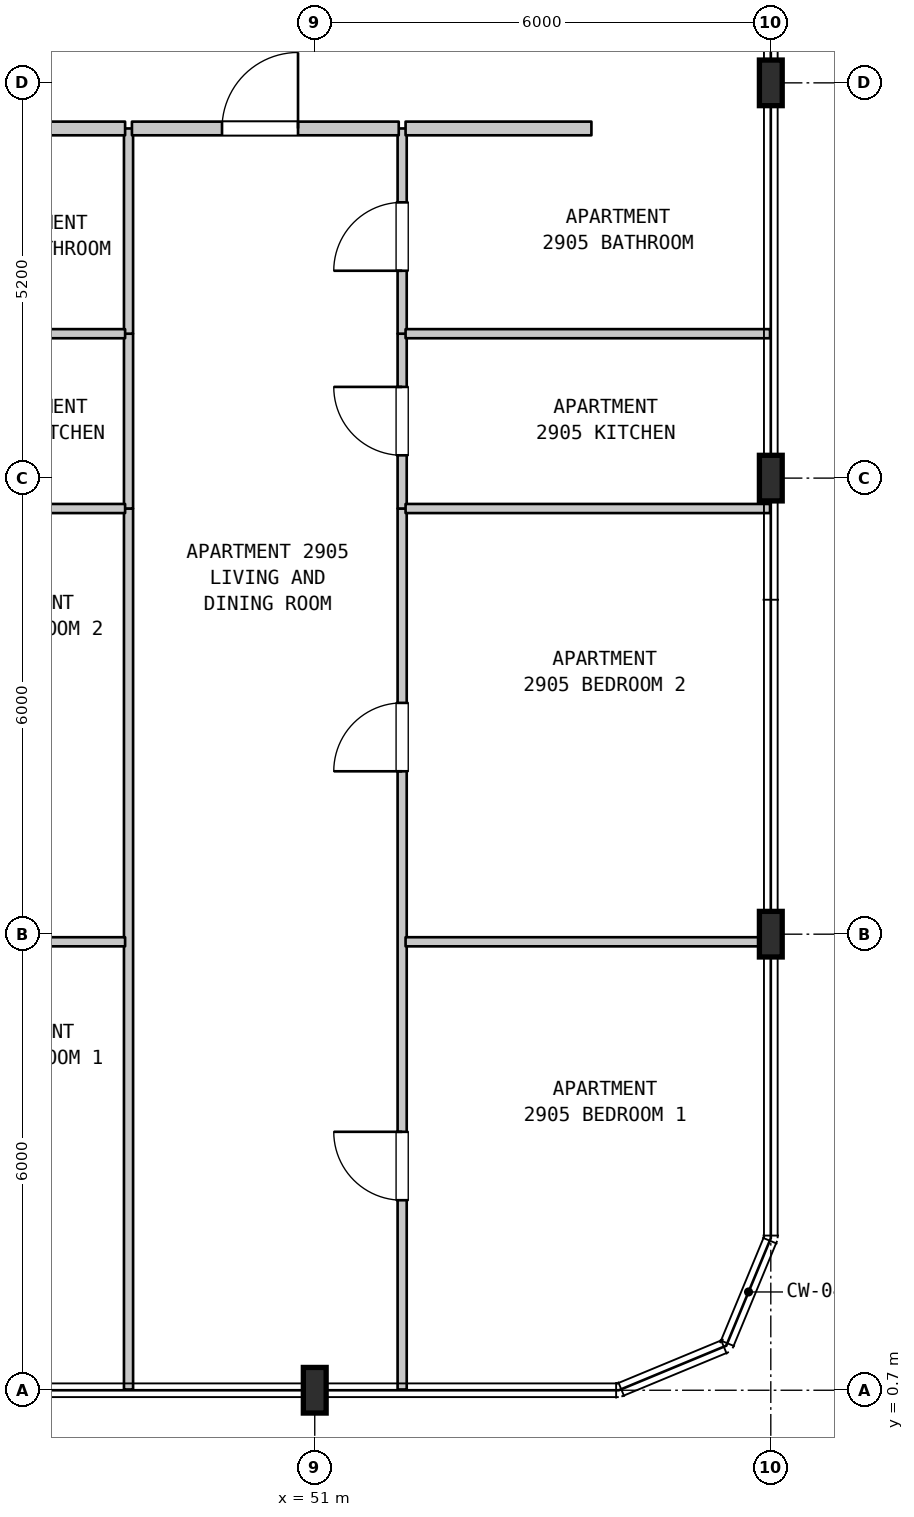
"""IFC4 building model, lengths in metres.
Left out: names, types, materials, properties, quantities, classifications, styles, units other than length and angle.
Written with IfcOpenShell. Run it as: python <this file> out.ifc"""

import sys

from ifc_helpers import new_model, si_unit, direction, frame, frame_2d, origin, origin_2d, place, context, subcontext, project, spatial, rectangle, i_section, extrude, element, fill, save


model = new_model("IFC4")
c1 = context("Model", 3, precision=1e-05, world=origin(), true_north=direction((0.0, 1.0)))
c2 = subcontext(c1, "Body", "Model", "MODEL_VIEW")
j1 = project(units=[si_unit("LENGTHUNIT", "METRE"), si_unit("PLANEANGLEUNIT", "RADIAN")], contexts=[c1])
p1 = place(None, origin())
s1 = spatial("IfcSite", under=j1, at=p1, CompositionType="ELEMENT")
p2 = place(p1, origin())
s2 = spatial("IfcBuilding", under=s1, at=p2, CompositionType="ELEMENT")
p3 = place(p2, frame((0.0, 0.0, 120.5)))
s3 = spatial("IfcBuildingStorey", under=s2, at=p3, CompositionType="ELEMENT", Elevation=120.5)
for number, where, z_axis, x_axis in (
    (1, (51.0, 0.7, 0.0), (0.0, 0.0, 1.0), (1.0, 0.0, 0.0)),
    (2, (57.0, 6.7, 0.0), (0.0, 0.0, 1.0), (1.0, 0.0, 0.0)),
    (3, (57.0, 12.7, 0.0), (0.0, 0.0, 1.0), (1.0, 0.0, 0.0)),
    (4, (57.0, 17.9, 0.0), (0.0, 0.0, 1.0), (1.0, 0.0, 0.0)),
):
    element("IfcColumn", number, at=place(p3, frame(where, z_axis=z_axis, x_axis=x_axis)), inside=s3, PredefinedType="COLUMN", context=c2, shape_type="SweptSolid", body=[
        extrude(i_section(OverallWidth=0.3, OverallDepth=0.6, WebThickness=0.015, FlangeThickness=0.03, FilletRadius=0.027, at=origin_2d()), origin(), (0.0, 0.0, 1.0), 4.8),
    ])
p4 = place(p3, frame((48.55, 0.71, 0.0), z_axis=(0.0, 0.0, 1.0), x_axis=(0.0, 1.0, 0.0)))
e5 = element("IfcWall", 5, at=p4, inside=s3, PredefinedType="PARTITIONING", context=c2, shape_type="SweptSolid", body=[
    extrude(rectangle(XDim=11.59, YDim=0.12, at=frame_2d((5.795, 0.0))), origin(), (0.0, 0.0, 1.0), 4.48),
])
p5 = place(p3, frame((48.55, 12.3, 0.0), z_axis=(0.0, 0.0, 1.0), x_axis=(0.0, 1.0, 0.0)))
e6 = element("IfcWall", 6, at=p5, inside=s3, PredefinedType="PARTITIONING", context=c2, shape_type="SweptSolid", body=[
    extrude(rectangle(XDim=2.3, YDim=0.12, at=frame_2d((1.15, 0.0))), origin(), (0.0, 0.0, 1.0), 4.48),
])
p6 = place(p3, frame((48.55, 14.6, 0.0), z_axis=(0.0, 0.0, 1.0), x_axis=(0.0, 1.0, 0.0)))
e7 = element("IfcWall", 7, at=p6, inside=s3, PredefinedType="PARTITIONING", context=c2, shape_type="SweptSolid", body=[
    extrude(rectangle(XDim=2.7, YDim=0.12, at=frame_2d((1.35, 0.0))), origin(), (0.0, 0.0, 1.0), 4.48),
])
p7 = place(p3, frame((52.15, 0.71, 0.0), z_axis=(0.0, 0.0, 1.0), x_axis=(0.0, 1.0, 0.0)))
e8 = element("IfcWall", 8, at=p7, inside=s3, PredefinedType="PARTITIONING", context=c2, shape_type="SweptSolid", body=[
    extrude(rectangle(XDim=11.59, YDim=0.12, at=frame_2d((5.795, 0.0))), origin(), (0.0, 0.0, 1.0), 4.48),
])
p8 = place(p7, frame((2.49, 0.0, 0.0)))
e9 = element("IfcOpeningElement", 9, at=p8, cuts=e8, PredefinedType="OPENING", context=c2, shape_type="SweptSolid", body=[
    extrude(rectangle(XDim=0.9, YDim=2.15, at=frame_2d((0.45, 1.075))), frame((0.0, 0.07, 0.0), z_axis=(0.0, -1.0, 0.0), x_axis=(1.0, 0.0, 0.0)), (0.0, 0.0, 1.0), 0.14),
])
p9 = place(p7, frame((8.133, 0.0, 0.0)))
e10 = element("IfcOpeningElement", 10, at=p9, cuts=e8, PredefinedType="OPENING", context=c2, shape_type="SweptSolid", body=[
    extrude(rectangle(XDim=0.9, YDim=2.15, at=frame_2d((0.45, 1.075))), frame((0.0, 0.07, 0.0), z_axis=(0.0, -1.0, 0.0), x_axis=(1.0, 0.0, 0.0)), (0.0, 0.0, 1.0), 0.14),
])
p10 = place(p3, frame((52.15, 12.3, 0.0), z_axis=(0.0, 0.0, 1.0), x_axis=(0.0, 1.0, 0.0)))
e11 = element("IfcWall", 11, at=p10, inside=s3, PredefinedType="PARTITIONING", context=c2, shape_type="SweptSolid", body=[
    extrude(rectangle(XDim=2.3, YDim=0.12, at=frame_2d((1.15, 0.0))), origin(), (0.0, 0.0, 1.0), 4.48),
])
p11 = place(p10, frame((0.7, 0.0, 0.0)))
e12 = element("IfcOpeningElement", 12, at=p11, cuts=e11, PredefinedType="OPENING", context=c2, shape_type="SweptSolid", body=[
    extrude(rectangle(XDim=0.9, YDim=2.15, at=frame_2d((0.45, 1.075))), frame((0.0, 0.07, 0.0), z_axis=(0.0, -1.0, 0.0), x_axis=(1.0, 0.0, 0.0)), (0.0, 0.0, 1.0), 0.14),
])
p12 = place(p3, frame((52.15, 14.6, 0.0), z_axis=(0.0, 0.0, 1.0), x_axis=(0.0, 1.0, 0.0)))
e13 = element("IfcWall", 13, at=p12, inside=s3, PredefinedType="PARTITIONING", context=c2, shape_type="SweptSolid", body=[
    extrude(rectangle(XDim=2.7, YDim=0.12, at=frame_2d((1.35, 0.0))), origin(), (0.0, 0.0, 1.0), 4.48),
])
p13 = place(p12, frame((0.828, 0.0, 0.0)))
e14 = element("IfcOpeningElement", 14, at=p13, cuts=e13, PredefinedType="OPENING", context=c2, shape_type="SweptSolid", body=[
    extrude(rectangle(XDim=0.9, YDim=2.1, at=frame_2d((0.45, 1.05))), frame((0.0, 0.07, 0.0), z_axis=(0.0, -1.0, 0.0), x_axis=(1.0, 0.0, 0.0)), (0.0, 0.0, 1.0), 0.14),
])
p14 = place(p3, frame((45.555, 6.6, 0.0), z_axis=(0.0, 0.0, 1.0), x_axis=(1.0, 0.0, 0.0)))
e15 = element("IfcWall", 15, at=p14, inside=s3, PredefinedType="PARTITIONING", context=c2, shape_type="SweptSolid", body=[
    extrude(rectangle(XDim=2.95, YDim=0.12, at=frame_2d((1.475, 0.0))), origin(), (0.0, 0.0, 1.0), 3.88),
])
p15 = place(p3, frame((52.195, 6.6, 0.0), z_axis=(0.0, 0.0, 1.0), x_axis=(1.0, 0.0, 0.0)))
e16 = element("IfcWall", 16, at=p15, inside=s3, PredefinedType="PARTITIONING", context=c2, shape_type="SweptSolid", body=[
    extrude(rectangle(XDim=4.795, YDim=0.12, at=frame_2d((2.397, 0.0))), origin(), (0.0, 0.0, 1.0), 3.88),
])
p16 = place(p3, frame((45.555, 12.3, 0.0), z_axis=(0.0, 0.0, 1.0), x_axis=(1.0, 0.0, 0.0)))
e17 = element("IfcWall", 17, at=p16, inside=s3, PredefinedType="PARTITIONING", context=c2, shape_type="SweptSolid", body=[
    extrude(rectangle(XDim=2.95, YDim=0.12, at=frame_2d((1.475, 0.0))), origin(), (0.0, 0.0, 1.0), 4.48),
])
p17 = place(p3, frame((52.195, 12.3, 0.0), z_axis=(0.0, 0.0, 1.0), x_axis=(1.0, 0.0, 0.0)))
e18 = element("IfcWall", 18, at=p17, inside=s3, PredefinedType="PARTITIONING", context=c2, shape_type="SweptSolid", body=[
    extrude(rectangle(XDim=4.795, YDim=0.12, at=frame_2d((2.397, 0.0))), origin(), (0.0, 0.0, 1.0), 4.48),
])
p18 = place(p3, frame((45.555, 14.6, 0.0), z_axis=(0.0, 0.0, 1.0), x_axis=(1.0, 0.0, 0.0)))
e19 = element("IfcWall", 19, at=p18, inside=s3, PredefinedType="PARTITIONING", context=c2, shape_type="SweptSolid", body=[
    extrude(rectangle(XDim=2.95, YDim=0.12, at=frame_2d((1.475, 0.0))), origin(), (0.0, 0.0, 1.0), 4.48),
])
p19 = place(p3, frame((52.195, 14.6, 0.0), z_axis=(0.0, 0.0, 1.0), x_axis=(1.0, 0.0, 0.0)))
e20 = element("IfcWall", 20, at=p19, inside=s3, PredefinedType="PARTITIONING", context=c2, shape_type="SweptSolid", body=[
    extrude(rectangle(XDim=4.795, YDim=0.12, at=frame_2d((2.397, 0.0))), origin(), (0.0, 0.0, 1.0), 4.48),
])
p20 = place(p3, frame((45.555, 17.3, 0.0), z_axis=(0.0, 0.0, 1.0), x_axis=(1.0, 0.0, 0.0)))
e21 = element("IfcWall", 21, at=p20, inside=s3, PredefinedType="STANDARD", context=c2, shape_type="SweptSolid", body=[
    extrude(rectangle(XDim=2.95, YDim=0.18, at=frame_2d((1.475, 0.0))), origin(), (0.0, 0.0, 1.0), 4.48),
])
p21 = place(p3, frame((48.595, 17.3, 0.0), z_axis=(0.0, 0.0, 1.0), x_axis=(1.0, 0.0, 0.0)))
e22 = element("IfcWall", 22, at=p21, inside=s3, PredefinedType="STANDARD", context=c2, shape_type="SweptSolid", body=[
    extrude(rectangle(XDim=3.51, YDim=0.18, at=frame_2d((1.755, 0.0))), origin(), (0.0, 0.0, 1.0), 4.48),
])
p22 = place(p21, frame((1.185, 0.0, 0.0)))
e23 = element("IfcOpeningElement", 23, at=p22, cuts=e22, PredefinedType="OPENING", context=c2, shape_type="SweptSolid", body=[
    extrude(rectangle(XDim=1.0, YDim=2.15, at=frame_2d((0.5, 1.075))), frame((0.0, 0.1, 0.0), z_axis=(0.0, -1.0, 0.0), x_axis=(1.0, 0.0, 0.0)), (0.0, 0.0, 1.0), 0.2),
])
p23 = place(p3, frame((52.195, 17.3, 0.0), z_axis=(0.0, 0.0, 1.0), x_axis=(1.0, 0.0, 0.0)))
e24 = element("IfcWall", 24, at=p23, inside=s3, PredefinedType="STANDARD", context=c2, shape_type="SweptSolid", body=[
    extrude(rectangle(XDim=2.445, YDim=0.18, at=frame_2d((1.222, 0.0))), origin(), (0.0, 0.0, 1.0), 4.48),
])
p24 = place(p8, origin())
e25 = element("IfcDoor", 25, at=p24, inside=s3, OperationType="SINGLE_SWING_RIGHT", PredefinedType="DOOR", context=c2, shape_type="SweptSolid", body=[
    extrude(rectangle(XDim=0.9, YDim=2.15, at=frame_2d((0.45, 1.075))), frame((0.0, 0.025, 0.0), z_axis=(0.0, -1.0, 0.0), x_axis=(1.0, 0.0, 0.0)), (0.0, 0.0, 1.0), 0.05),
])
fill(e9, e25)
p25 = place(p9, origin())
e26 = element("IfcDoor", 26, at=p25, inside=s3, OperationType="SINGLE_SWING_LEFT", PredefinedType="DOOR", context=c2, shape_type="SweptSolid", body=[
    extrude(rectangle(XDim=0.9, YDim=2.15, at=frame_2d((0.45, 1.075))), frame((0.0, 0.025, 0.0), z_axis=(0.0, -1.0, 0.0), x_axis=(1.0, 0.0, 0.0)), (0.0, 0.0, 1.0), 0.05),
])
fill(e10, e26)
p26 = place(p11, origin())
e27 = element("IfcDoor", 27, at=p26, inside=s3, OperationType="SINGLE_SWING_RIGHT", PredefinedType="DOOR", context=c2, shape_type="SweptSolid", body=[
    extrude(rectangle(XDim=0.9, YDim=2.15, at=frame_2d((0.45, 1.075))), frame((0.0, 0.025, 0.0), z_axis=(0.0, -1.0, 0.0), x_axis=(1.0, 0.0, 0.0)), (0.0, 0.0, 1.0), 0.05),
])
fill(e12, e27)
p27 = place(p13, origin())
e28 = element("IfcDoor", 28, at=p27, inside=s3, OperationType="SINGLE_SWING_LEFT", PredefinedType="DOOR", context=c2, shape_type="SweptSolid", body=[
    extrude(rectangle(XDim=0.9, YDim=2.1, at=frame_2d((0.45, 1.05))), frame((0.0, 0.025, 0.0), z_axis=(0.0, -1.0, 0.0), x_axis=(1.0, 0.0, 0.0)), (0.0, 0.0, 1.0), 0.05),
])
fill(e14, e28)
p28 = place(p22, origin())
e29 = element("IfcDoor", 29, at=p28, inside=s3, OperationType="SINGLE_SWING_RIGHT", PredefinedType="DOOR", context=c2, shape_type="SweptSolid", body=[
    extrude(rectangle(XDim=1.0, YDim=2.15, at=frame_2d((0.5, 1.075))), frame((0.0, 0.025, 0.0), z_axis=(0.0, -1.0, 0.0), x_axis=(1.0, 0.0, 0.0)), (0.0, 0.0, 1.0), 0.05),
])
fill(e23, e29)
save(model, sys.argv[1])
